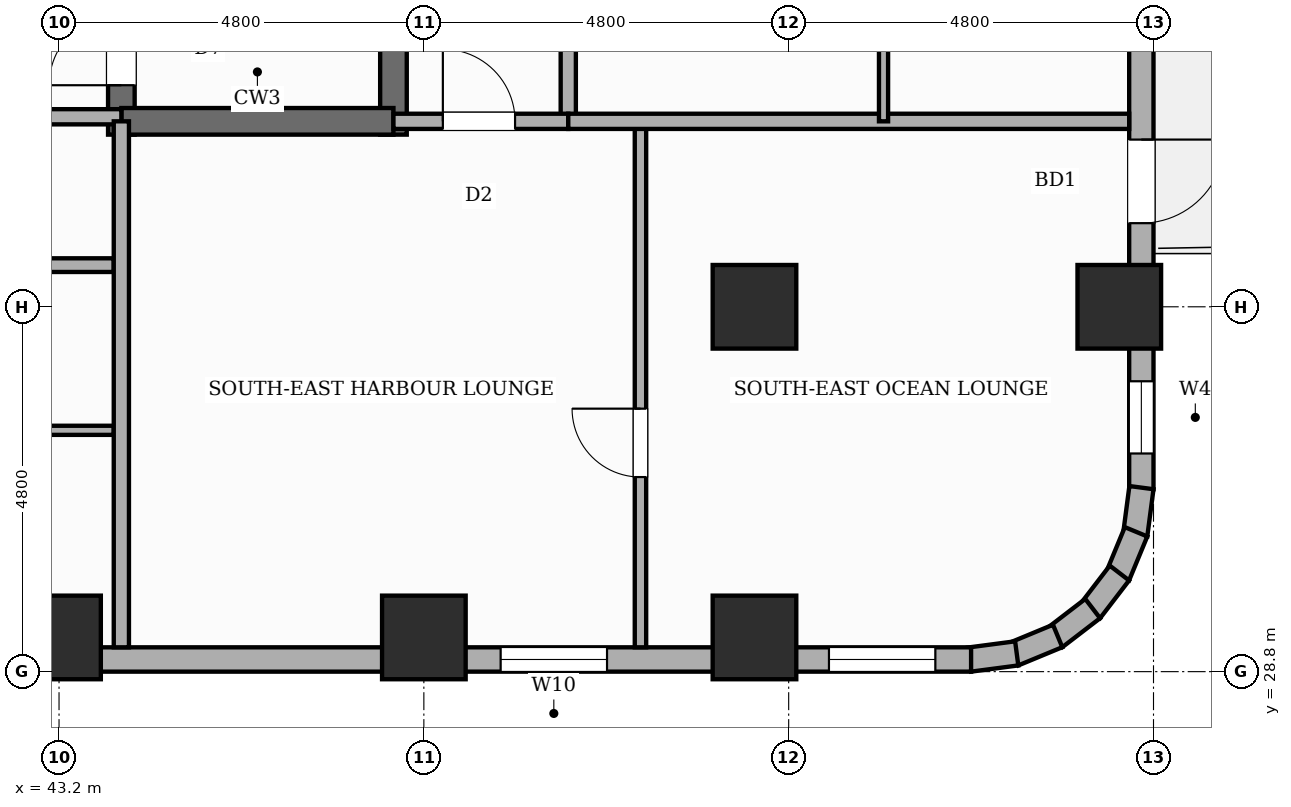
"""IFC4 building model, lengths in metres.
Left out: names, types, materials, properties, quantities, classifications, styles, units other than length and angle.
Written with IfcOpenShell. Run it as: python <this file> out.ifc"""

import sys

from ifc_helpers import new_model, si_unit, direction, frame, frame_2d, origin, origin_2d, place, context, subcontext, project, spatial, rectangle, extrude, element, fill, save


model = new_model("IFC4")
c1 = context("Model", 3, precision=1e-05, world=origin(), true_north=direction((0.0, 1.0)))
c2 = subcontext(c1, "Body", "Model", "MODEL_VIEW")
j1 = project(units=[si_unit("LENGTHUNIT", "METRE"), si_unit("PLANEANGLEUNIT", "RADIAN")], contexts=[c1])
p1 = place(None, origin())
s1 = spatial("IfcSite", under=j1, at=p1, CompositionType="ELEMENT")
p2 = place(p1, origin())
s2 = spatial("IfcBuilding", under=s1, at=p2, CompositionType="ELEMENT")
p3 = place(p2, frame((0.0, 0.0, 28.6)))
s3 = spatial("IfcBuildingStorey", under=s2, at=p3, CompositionType="ELEMENT", Elevation=28.6)
p4 = place(p3, frame((44.02, 35.865, 0.0), z_axis=(0.0, 0.0, 1.0), x_axis=(0.0, 1.0, 0.0)))
e1 = element("IfcWall", 1, at=p4, inside=s3, PredefinedType="SHEAR", context=c2, shape_type="SweptSolid", body=[
    extrude(rectangle(XDim=8.97, YDim=0.35, at=frame_2d((4.485, 0.0))), origin(), (0.0, 0.0, 1.0), 3.6),
])
p5 = place(p4, frame((0.65, 0.0, 0.0)))
e2 = element("IfcOpeningElement", 2, at=p5, cuts=e1, PredefinedType="OPENING", context=c2, shape_type="SweptSolid", body=[
    extrude(rectangle(XDim=0.95, YDim=2.1, at=frame_2d((0.475, 1.05))), frame((0.0, 0.185, 0.0), z_axis=(0.0, -1.0, 0.0), x_axis=(1.0, 0.0, 0.0)), (0.0, 0.0, 1.0), 0.37),
])
p6 = place(p3, frame((47.6, 35.865, 0.0), z_axis=(0.0, 0.0, 1.0), x_axis=(0.0, 1.0, 0.0)))
e3 = element("IfcWall", 3, at=p6, inside=s3, PredefinedType="SHEAR", context=c2, shape_type="SweptSolid", body=[
    extrude(rectangle(XDim=8.97, YDim=0.35, at=frame_2d((4.485, 0.0))), origin(), (0.0, 0.0, 1.0), 3.6),
])
p7 = place(p3, frame((44.02, 36.04, 0.0), z_axis=(0.0, 0.0, 1.0), x_axis=(1.0, 0.0, 0.0)))
e4 = element("IfcWall", 4, at=p7, inside=s3, PredefinedType="SHEAR", context=c2, shape_type="SweptSolid", body=[
    extrude(rectangle(XDim=3.58, YDim=0.35, at=frame_2d((1.79, 0.0))), origin(), (0.0, 0.0, 1.0), 3.6),
])
for number, where, z_axis, x_axis in (
    (5, (43.2, 29.25, 0.0), (0.0, 0.0, 1.0), (1.0, 0.0, 0.0)),
    (6, (48.0, 29.25, 0.0), (0.0, 0.0, 1.0), (1.0, 0.0, 0.0)),
    (7, (52.35, 29.25, 0.0), (0.0, 0.0, 1.0), (1.0, 0.0, 0.0)),
    (8, (52.35, 33.6, 0.0), (0.0, 0.0, 1.0), (1.0, 0.0, 0.0)),
    (9, (57.15, 33.6, 0.0), (0.0, 0.0, 1.0), (1.0, 0.0, 0.0)),
):
    element("IfcColumn", number, at=place(p3, frame(where, z_axis=z_axis, x_axis=x_axis)), inside=s3, PredefinedType="COLUMN", context=c2, shape_type="SweptSolid", body=[
        extrude(rectangle(XDim=1.1, YDim=1.1, at=origin_2d()), origin(), (0.0, 0.0, 1.0), 3.6),
    ])
p8 = place(p3, frame((57.44, 45.6, 0.0), z_axis=(0.0, 0.0, 1.0), x_axis=(0.0, -1.0, 0.0)))
e10 = element("IfcWall", 10, at=p8, inside=s3, PredefinedType="STANDARD", context=c2, shape_type="SweptSolid", body=[
    extrude(rectangle(XDim=14.4, YDim=0.32, at=frame_2d((7.2, 0.0))), origin(), (0.0, 0.0, 1.0), 2.53),
])
p9 = place(p8, frame((9.8, 0.0, 0.0)))
e11 = element("IfcOpeningElement", 11, at=p9, cuts=e10, PredefinedType="OPENING", context=c2, shape_type="SweptSolid", body=[
    extrude(rectangle(XDim=1.1, YDim=2.15, at=frame_2d((0.55, 1.075))), frame((0.0, 0.17, 0.0), z_axis=(0.0, -1.0, 0.0), x_axis=(1.0, 0.0, 0.0)), (0.0, 0.0, 1.0), 0.34),
])
p10 = place(p8, frame((5.428, 0.0, 0.45)))
e12 = element("IfcOpeningElement", 12, at=p10, cuts=e10, PredefinedType="OPENING", context=c2, shape_type="SweptSolid", body=[
    extrude(rectangle(XDim=0.95, YDim=1.8, at=frame_2d((0.475, 0.9))), frame((0.0, 0.17, 0.0), z_axis=(0.0, -1.0, 0.0), x_axis=(1.0, 0.0, 0.0)), (0.0, 0.0, 1.0), 0.34),
])
p11 = place(p8, frame((12.98, 0.0, 0.45)))
e13 = element("IfcOpeningElement", 13, at=p11, cuts=e10, PredefinedType="OPENING", context=c2, shape_type="SweptSolid", body=[
    extrude(rectangle(XDim=0.95, YDim=1.8, at=frame_2d((0.475, 0.9))), frame((0.0, 0.17, 0.0), z_axis=(0.0, -1.0, 0.0), x_axis=(1.0, 0.0, 0.0)), (0.0, 0.0, 1.0), 0.34),
])
p12 = place(p8, frame((0.771, 0.0, 0.45)))
e14 = element("IfcOpeningElement", 14, at=p12, cuts=e10, PredefinedType="OPENING", context=c2, shape_type="SweptSolid", body=[
    extrude(rectangle(XDim=0.75, YDim=1.8, at=frame_2d((0.375, 0.9))), frame((0.0, 0.17, 0.0), z_axis=(0.0, -1.0, 0.0), x_axis=(1.0, 0.0, 0.0)), (0.0, 0.0, 1.0), 0.34),
])
p13 = place(p3, frame((57.441, 31.221, 0.0), z_axis=(0.0, 0.0, 1.0), x_axis=(-0.130504898859, -0.991447664465, 0.0)))
e15 = element("IfcWall", 15, at=p13, inside=s3, PredefinedType="STANDARD", context=c2, shape_type="SweptSolid", body=[
    extrude(rectangle(XDim=0.627, YDim=0.32, at=frame_2d((0.313, 0.0))), origin(), (0.0, 0.0, 1.0), 3.35),
])
p14 = place(p3, frame((57.37, 30.64, 0.0), z_axis=(0.0, 0.0, 1.0), x_axis=(-0.382787856107, -0.923836271867, 0.0)))
e16 = element("IfcWall", 16, at=p14, inside=s3, PredefinedType="STANDARD", context=c2, shape_type="SweptSolid", body=[
    extrude(rectangle(XDim=0.626, YDim=0.32, at=frame_2d((0.313, 0.0))), origin(), (0.0, 0.0, 1.0), 3.35),
])
p15 = place(p3, frame((57.152, 30.097, 0.0), z_axis=(0.0, 0.0, 1.0), x_axis=(-0.608693302629, -0.793405610854, 0.0)))
e17 = element("IfcWall", 17, at=p15, inside=s3, PredefinedType="STANDARD", context=c2, shape_type="SweptSolid", body=[
    extrude(rectangle(XDim=0.626, YDim=0.32, at=frame_2d((0.313, 0.0))), origin(), (0.0, 0.0, 1.0), 3.35),
])
p16 = place(p3, frame((56.8, 29.63, 0.0), z_axis=(0.0, 0.0, 1.0), x_axis=(-0.793361818833, -0.608750379399, 0.0)))
e18 = element("IfcWall", 18, at=p16, inside=s3, PredefinedType="STANDARD", context=c2, shape_type="SweptSolid", body=[
    extrude(rectangle(XDim=0.627, YDim=0.32, at=frame_2d((0.313, 0.0))), origin(), (0.0, 0.0, 1.0), 3.35),
])
for number, where, z_axis, x_axis in (
    (19, (56.339, 29.269, 0.0), (0.0, 0.0, 1.0), (-0.924, -0.383, 0.0)),
    (20, (55.8, 29.04, 0.0), (0.0, 0.0, 1.0), (-0.991, -0.131, 0.0)),
):
    element("IfcWall", number, at=place(p3, frame(where, z_axis=z_axis, x_axis=x_axis)), inside=s3, PredefinedType="STANDARD", context=c2, shape_type="SweptSolid", body=[
        extrude(rectangle(XDim=0.626, YDim=0.32, at=frame_2d((0.313, 0.0))), origin(), (0.0, 0.0, 1.0), 3.35),
    ])
p17 = place(p3, frame((55.2, 28.96, 0.0), z_axis=(0.0, 0.0, 1.0), x_axis=(-1.0, 0.0, 0.0)))
e21 = element("IfcWall", 21, at=p17, inside=s3, PredefinedType="STANDARD", context=c2, shape_type="SweptSolid", body=[
    extrude(rectangle(XDim=28.8, YDim=0.32, at=frame_2d((14.4, 0.0))), origin(), (0.0, 0.0, 1.0), 2.53),
])
p18 = place(p17, frame((24.115, 0.0, 0.65)))
e22 = element("IfcOpeningElement", 22, at=p18, cuts=e21, PredefinedType="OPENING", context=c2, shape_type="SweptSolid", body=[
    extrude(rectangle(XDim=1.4, YDim=1.1, at=frame_2d((0.7, 0.55))), frame((0.0, 0.17, 0.0), z_axis=(0.0, -1.0, 0.0), x_axis=(1.0, 0.0, 0.0)), (0.0, 0.0, 1.0), 0.34),
])
p19 = place(p17, frame((12.991, 0.0, 0.65)))
e23 = element("IfcOpeningElement", 23, at=p19, cuts=e21, PredefinedType="OPENING", context=c2, shape_type="SweptSolid", body=[
    extrude(rectangle(XDim=1.4, YDim=1.1, at=frame_2d((0.7, 0.55))), frame((0.0, 0.17, 0.0), z_axis=(0.0, -1.0, 0.0), x_axis=(1.0, 0.0, 0.0)), (0.0, 0.0, 1.0), 0.34),
])
p20 = place(p17, frame((19.869, 0.0, 0.45)))
e24 = element("IfcOpeningElement", 24, at=p20, cuts=e21, PredefinedType="OPENING", context=c2, shape_type="SweptSolid", body=[
    extrude(rectangle(XDim=0.95, YDim=1.8, at=frame_2d((0.475, 0.9))), frame((0.0, 0.17, 0.0), z_axis=(0.0, -1.0, 0.0), x_axis=(1.0, 0.0, 0.0)), (0.0, 0.0, 1.0), 0.34),
])
p21 = place(p17, frame((4.79, 0.0, 0.65)))
e25 = element("IfcOpeningElement", 25, at=p21, cuts=e21, PredefinedType="OPENING", context=c2, shape_type="SweptSolid", body=[
    extrude(rectangle(XDim=1.4, YDim=1.1, at=frame_2d((0.7, 0.55))), frame((0.0, 0.17, 0.0), z_axis=(0.0, -1.0, 0.0), x_axis=(1.0, 0.0, 0.0)), (0.0, 0.0, 1.0), 0.34),
])
p22 = place(p17, frame((0.47, 0.0, 0.65)))
e26 = element("IfcOpeningElement", 26, at=p22, cuts=e21, PredefinedType="OPENING", context=c2, shape_type="SweptSolid", body=[
    extrude(rectangle(XDim=1.4, YDim=1.1, at=frame_2d((0.7, 0.55))), frame((0.0, 0.17, 0.0), z_axis=(0.0, -1.0, 0.0), x_axis=(1.0, 0.0, 0.0)), (0.0, 0.0, 1.0), 0.34),
])
p23 = place(p17, frame((15.046, 0.0, 0.45)))
e27 = element("IfcOpeningElement", 27, at=p23, cuts=e21, PredefinedType="OPENING", context=c2, shape_type="SweptSolid", body=[
    extrude(rectangle(XDim=0.95, YDim=1.8, at=frame_2d((0.475, 0.9))), frame((0.0, 0.17, 0.0), z_axis=(0.0, -1.0, 0.0), x_axis=(1.0, 0.0, 0.0)), (0.0, 0.0, 1.0), 0.34),
])
p24 = place(p3, frame((22.75, 36.1, 0.0), z_axis=(0.0, 0.0, 1.0), x_axis=(1.0, 0.0, 0.0)))
e28 = element("IfcWall", 28, at=p24, inside=s3, PredefinedType="PARTITIONING", context=c2, shape_type="SweptSolid", body=[
    extrude(rectangle(XDim=21.27, YDim=0.2, at=frame_2d((10.635, 0.0))), origin(), (0.0, 0.0, 1.0), 3.35),
])
p25 = place(p24, frame((1.628, 0.0, 0.0)))
e29 = element("IfcOpeningElement", 29, at=p25, cuts=e28, PredefinedType="OPENING", context=c2, shape_type="SweptSolid", body=[
    extrude(rectangle(XDim=0.98, YDim=2.18, at=frame_2d((0.49, 1.09))), frame((0.0, 0.11, 0.0), z_axis=(0.0, -1.0, 0.0), x_axis=(1.0, 0.0, 0.0)), (0.0, 0.0, 1.0), 0.22),
])
p26 = place(p24, frame((14.725, 0.0, 0.0)))
e30 = element("IfcOpeningElement", 30, at=p26, cuts=e28, PredefinedType="OPENING", context=c2, shape_type="SweptSolid", body=[
    extrude(rectangle(XDim=0.98, YDim=2.18, at=frame_2d((0.49, 1.09))), frame((0.0, 0.11, 0.0), z_axis=(0.0, -1.0, 0.0), x_axis=(1.0, 0.0, 0.0)), (0.0, 0.0, 1.0), 0.22),
])
p27 = place(p3, frame((40.388, 31.975, 0.0), z_axis=(0.0, 0.0, 1.0), x_axis=(1.0, 0.0, 0.0)))
e31 = element("IfcWall", 31, at=p27, inside=s3, PredefinedType="PARTITIONING", context=c2, shape_type="SweptSolid", body=[
    extrude(rectangle(XDim=3.532, YDim=0.12, at=frame_2d((1.766, 0.0))), origin(), (0.0, 0.0, 1.0), 3.35),
])
p28 = place(p3, frame((40.388, 34.148, 0.0), z_axis=(0.0, 0.0, 1.0), x_axis=(1.0, 0.0, 0.0)))
e32 = element("IfcWall", 32, at=p28, inside=s3, PredefinedType="PLUMBINGWALL", context=c2, shape_type="SweptSolid", body=[
    extrude(rectangle(XDim=3.532, YDim=0.18, at=frame_2d((1.766, 0.0))), origin(), (0.0, 0.0, 1.0), 3.35),
])
p29 = place(p3, frame((49.9, 36.04, 0.0), z_axis=(0.0, 0.0, 1.0), x_axis=(0.0, 1.0, 0.0)))
e33 = element("IfcWall", 33, at=p29, inside=s3, PredefinedType="PARTITIONING", context=c2, shape_type="SweptSolid", body=[
    extrude(rectangle(XDim=11.64, YDim=0.2, at=frame_2d((5.82, 0.0))), origin(), (0.0, 0.0, 1.0), 3.35),
])
p30 = place(p29, frame((6.251, 0.0, 0.0)))
e34 = element("IfcOpeningElement", 34, at=p30, cuts=e33, PredefinedType="OPENING", context=c2, shape_type="SweptSolid", body=[
    extrude(rectangle(XDim=0.98, YDim=2.18, at=frame_2d((0.49, 1.09))), frame((0.0, 0.11, 0.0), z_axis=(0.0, -1.0, 0.0), x_axis=(1.0, 0.0, 0.0)), (0.0, 0.0, 1.0), 0.22),
])
p31 = place(p3, frame((47.6, 36.04, 0.0), z_axis=(0.0, 0.0, 1.0), x_axis=(1.0, 0.0, 0.0)))
e35 = element("IfcWall", 35, at=p31, inside=s3, PredefinedType="PARTITIONING", context=c2, shape_type="SweptSolid", body=[
    extrude(rectangle(XDim=2.3, YDim=0.2, at=frame_2d((1.15, 0.0))), origin(), (0.0, 0.0, 1.0), 3.35),
])
p32 = place(p31, frame((0.65, 0.0, 0.0)))
e36 = element("IfcOpeningElement", 36, at=p32, cuts=e35, PredefinedType="OPENING", context=c2, shape_type="SweptSolid", body=[
    extrude(rectangle(XDim=0.95, YDim=2.15, at=frame_2d((0.475, 1.075))), frame((0.0, 0.11, 0.0), z_axis=(0.0, -1.0, 0.0), x_axis=(1.0, 0.0, 0.0)), (0.0, 0.0, 1.0), 0.22),
])
p33 = place(p3, frame((44.02, 29.12, 0.0), z_axis=(0.0, 0.0, 1.0), x_axis=(0.0, 1.0, 0.0)))
e37 = element("IfcWall", 37, at=p33, inside=s3, PredefinedType="SOLIDWALL", context=c2, shape_type="SweptSolid", body=[
    extrude(rectangle(XDim=6.92, YDim=0.2, at=frame_2d((3.46, 0.0))), origin(), (0.0, 0.0, 1.0), 3.35),
])
p34 = place(p3, frame((50.85, 29.12, 0.0), z_axis=(0.0, 0.0, 1.0), x_axis=(0.0, 1.0, 0.0)))
e38 = element("IfcWall", 38, at=p34, inside=s3, PredefinedType="PARTITIONING", context=c2, shape_type="SweptSolid", body=[
    extrude(rectangle(XDim=6.92, YDim=0.15, at=frame_2d((3.46, 0.0))), origin(), (0.0, 0.0, 1.0), 3.35),
])
p35 = place(p34, frame((2.24, 0.0, 0.0)))
e39 = element("IfcOpeningElement", 39, at=p35, cuts=e38, PredefinedType="OPENING", context=c2, shape_type="SweptSolid", body=[
    extrude(rectangle(XDim=0.9, YDim=2.15, at=frame_2d((0.45, 1.075))), frame((0.0, 0.085, 0.0), z_axis=(0.0, -1.0, 0.0), x_axis=(1.0, 0.0, 0.0)), (0.0, 0.0, 1.0), 0.17),
])
p36 = place(p3, frame((49.9, 36.04, 0.0), z_axis=(0.0, 0.0, 1.0), x_axis=(1.0, 0.0, 0.0)))
e40 = element("IfcWall", 40, at=p36, inside=s3, PredefinedType="SOLIDWALL", context=c2, shape_type="SweptSolid", body=[
    extrude(rectangle(XDim=7.38, YDim=0.2, at=frame_2d((3.69, 0.0))), origin(), (0.0, 0.0, 1.0), 3.35),
])
p37 = place(p3, frame((54.048, 36.04, 0.0), z_axis=(0.0, 0.0, 1.0), x_axis=(0.0, 1.0, 0.0)))
e41 = element("IfcWall", 41, at=p37, inside=s3, PredefinedType="PARTITIONING", context=c2, shape_type="SweptSolid", body=[
    extrude(rectangle(XDim=4.384, YDim=0.12, at=frame_2d((2.192, 0.0))), origin(), (0.0, 0.0, 1.0), 3.35),
])
p38 = place(p9, origin())
e42 = element("IfcDoor", 42, at=p38, inside=s3, OperationType="SINGLE_SWING_LEFT", PredefinedType="DOOR", context=c2, shape_type="SweptSolid", body=[
    extrude(rectangle(XDim=1.1, YDim=2.15, at=frame_2d((0.55, 1.075))), frame((0.0, 0.025, 0.0), z_axis=(0.0, -1.0, 0.0), x_axis=(1.0, 0.0, 0.0)), (0.0, 0.0, 1.0), 0.05),
])
fill(e11, e42)
p39 = place(p11, origin())
e43 = element("IfcWindow", 43, at=p39, inside=s3, PartitioningType="SINGLE_PANEL", PredefinedType="WINDOW", context=c2, shape_type="SweptSolid", body=[
    extrude(rectangle(XDim=0.95, YDim=1.8, at=frame_2d((0.475, 0.9))), frame((0.0, 0.03, 0.0), z_axis=(0.0, -1.0, 0.0), x_axis=(1.0, 0.0, 0.0)), (0.0, 0.0, 1.0), 0.06),
])
fill(e13, e43)
p40 = place(p21, origin())
e44 = element("IfcWindow", 44, at=p40, inside=s3, PartitioningType="SINGLE_PANEL", PredefinedType="WINDOW", context=c2, shape_type="SweptSolid", body=[
    extrude(rectangle(XDim=1.4, YDim=1.1, at=frame_2d((0.7, 0.55))), frame((0.0, 0.03, 0.0), z_axis=(0.0, -1.0, 0.0), x_axis=(1.0, 0.0, 0.0)), (0.0, 0.0, 1.0), 0.06),
])
fill(e25, e44)
p41 = place(p22, origin())
e45 = element("IfcWindow", 45, at=p41, inside=s3, PartitioningType="SINGLE_PANEL", PredefinedType="WINDOW", context=c2, shape_type="SweptSolid", body=[
    extrude(rectangle(XDim=1.4, YDim=1.1, at=frame_2d((0.7, 0.55))), frame((0.0, 0.03, 0.0), z_axis=(0.0, -1.0, 0.0), x_axis=(1.0, 0.0, 0.0)), (0.0, 0.0, 1.0), 0.06),
])
fill(e26, e45)
p42 = place(p5, origin())
e46 = element("IfcDoor", 46, at=p42, inside=s3, OperationType="SINGLE_SWING_LEFT", PredefinedType="DOOR", context=c2, shape_type="SweptSolid", body=[
    extrude(rectangle(XDim=0.95, YDim=2.1, at=frame_2d((0.475, 1.05))), frame((0.0, 0.025, 0.0), z_axis=(0.0, -1.0, 0.0), x_axis=(1.0, 0.0, 0.0)), (0.0, 0.0, 1.0), 0.05),
])
fill(e2, e46)
p43 = place(p32, origin())
e47 = element("IfcDoor", 47, at=p43, inside=s3, OperationType="SINGLE_SWING_LEFT", PredefinedType="DOOR", context=c2, shape_type="SweptSolid", body=[
    extrude(rectangle(XDim=0.95, YDim=2.15, at=frame_2d((0.475, 1.075))), frame((0.0, 0.025, 0.0), z_axis=(0.0, -1.0, 0.0), x_axis=(1.0, 0.0, 0.0)), (0.0, 0.0, 1.0), 0.05),
])
fill(e36, e47)
p44 = place(p35, origin())
e48 = element("IfcDoor", 48, at=p44, inside=s3, OperationType="SINGLE_SWING_RIGHT", PredefinedType="DOOR", context=c2, shape_type="SweptSolid", body=[
    extrude(rectangle(XDim=0.9, YDim=2.15, at=frame_2d((0.45, 1.075))), frame((0.0, 0.025, 0.0), z_axis=(0.0, -1.0, 0.0), x_axis=(1.0, 0.0, 0.0)), (0.0, 0.0, 1.0), 0.05),
])
fill(e39, e48)
save(model, sys.argv[1])
